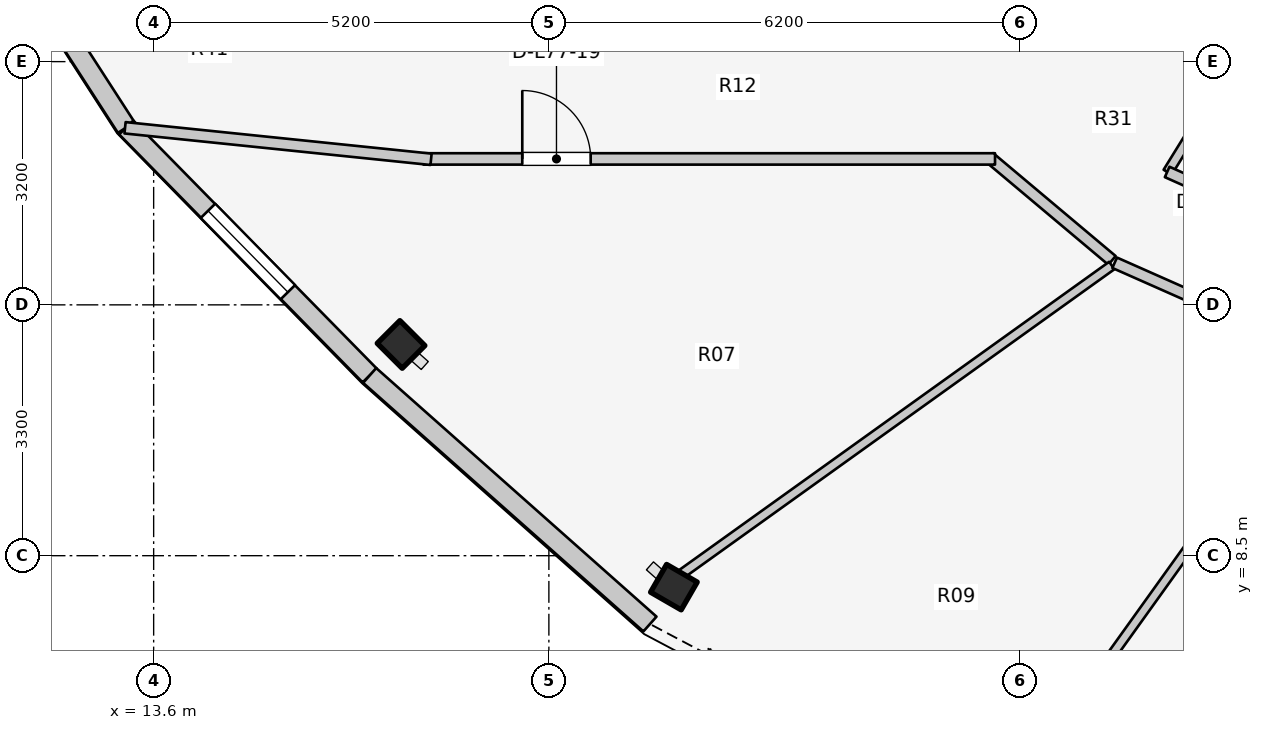
"""IFC4 building model, lengths in metres.
Left out: names, types, materials, properties, quantities, classifications, styles, units other than length and angle.
Written with IfcOpenShell. Run it as: python <this file> out.ifc"""

import sys

from ifc_helpers import new_model, si_unit, direction, frame, frame_2d, origin, origin_2d, place, context, subcontext, project, spatial, rectangle, i_section, extrude, element, fill, save


model = new_model("IFC4")
c1 = context("Model", 3, precision=1e-05, world=origin(), true_north=direction((0.0, 1.0)))
c2 = subcontext(c1, "Body", "Model", "MODEL_VIEW")
j1 = project(units=[si_unit("LENGTHUNIT", "METRE"), si_unit("PLANEANGLEUNIT", "RADIAN")], contexts=[c1])
p1 = place(None, origin())
s1 = spatial("IfcSite", under=j1, at=p1, CompositionType="ELEMENT")
p2 = place(p1, origin())
s2 = spatial("IfcBuilding", under=s1, at=p2, CompositionType="ELEMENT")
p3 = place(p2, frame((0.0, 0.0, 253.2)))
s3 = spatial("IfcBuildingStorey", under=s2, at=p3, CompositionType="ELEMENT", Elevation=253.2)
for number, where, z_axis, x_axis in (
    (1, (16.855, 11.279, 0.0), (0.0, 0.0, 1.0), (-0.707, -0.707, 0.0)),
    (2, (20.445, 8.086, 0.0), (0.0, 0.0, 1.0), (-0.5, -0.866, 0.0)),
):
    element("IfcColumn", number, at=place(p3, frame(where, z_axis=z_axis, x_axis=x_axis)), inside=s3, PredefinedType="COLUMN", context=c2, shape_type="SweptSolid", body=[
        extrude(i_section(OverallWidth=0.422, OverallDepth=0.465, WebThickness=0.045, FlangeThickness=0.073, FilletRadius=0.025, at=origin_2d()), origin(), (0.0, 0.0, 1.0), 3.6),
    ])
p4 = place(p3, frame((10.895, 17.761, 0.0), z_axis=(0.0, 0.0, 1.0), x_axis=(0.542641766008, -0.839964233634, 0.0)))
e3 = element("IfcWall", 3, at=p4, inside=s3, PredefinedType="STANDARD", context=c2, shape_type="SweptSolid", body=[
    extrude(rectangle(XDim=4.319, YDim=0.26, at=frame_2d((2.16, 0.0))), origin(), (0.0, 0.0, 1.0), 3.29),
])
p5 = place(p4, frame((1.41, 0.0, 0.75)))
e4 = element("IfcOpeningElement", 4, at=p5, cuts=e3, PredefinedType="OPENING", context=c2, shape_type="SweptSolid", body=[
    extrude(rectangle(XDim=1.5, YDim=1.6, at=frame_2d((0.75, 0.8))), frame((0.0, 0.14, 0.0), z_axis=(0.0, -1.0, 0.0), x_axis=(1.0, 0.0, 0.0)), (0.0, 0.0, 1.0), 0.28),
])
p6 = place(p3, frame((13.239, 14.133, 0.0), z_axis=(0.0, 0.0, 1.0), x_axis=(0.700642973333, -0.713512034881, 0.0)))
e5 = element("IfcWall", 5, at=p6, inside=s3, PredefinedType="STANDARD", context=c2, shape_type="SweptSolid", body=[
    extrude(rectangle(XDim=4.572, YDim=0.26, at=frame_2d((2.286, 0.0))), origin(), (0.0, 0.0, 1.0), 3.29),
])
p7 = place(p6, frame((1.536, 0.0, 0.75)))
e6 = element("IfcOpeningElement", 6, at=p7, cuts=e5, PredefinedType="OPENING", context=c2, shape_type="SweptSolid", body=[
    extrude(rectangle(XDim=1.5, YDim=1.6, at=frame_2d((0.75, 0.8))), frame((0.0, 0.14, 0.0), z_axis=(0.0, -1.0, 0.0), x_axis=(1.0, 0.0, 0.0)), (0.0, 0.0, 1.0), 0.28),
])
p8 = place(p3, frame((16.442, 10.871, 0.0), z_axis=(0.0, 0.0, 1.0), x_axis=(0.748165854006, -0.663511759428, 0.0)))
e7 = element("IfcWall", 7, at=p8, inside=s3, PredefinedType="STANDARD", context=c2, shape_type="SweptSolid", body=[
    extrude(rectangle(XDim=4.929, YDim=0.26, at=frame_2d((2.464, 0.0))), origin(), (0.0, 0.0, 1.0), 3.29),
])
p9 = place(p3, frame((28.45, 15.985, 0.0), z_axis=(0.0, 0.0, 1.0), x_axis=(-0.52592395012, -0.850531597702, 0.0)))
e8 = element("IfcWall", 8, at=p9, inside=s3, PredefinedType="PARTITIONING", context=c2, shape_type="SweptSolid", body=[
    extrude(rectangle(XDim=2.869, YDim=0.125, at=frame_2d((1.435, 0.0))), origin(), (0.0, 0.0, 1.0), 2.672),
])
p10 = place(p3, frame((26.935, 13.549, 0.0), z_axis=(0.0, 0.0, 1.0), x_axis=(0.912859324183, -0.408274239027, 0.0)))
e9 = element("IfcWall", 9, at=p10, inside=s3, PredefinedType="PARTITIONING", context=c2, shape_type="SweptSolid", body=[
    extrude(rectangle(XDim=2.682, YDim=0.15, at=frame_2d((1.341, 0.0))), origin(), (0.0, 0.0, 1.0), 2.816),
])
p11 = place(p3, frame((26.209, 12.385, 0.0), z_axis=(0.0, 0.0, 1.0), x_axis=(-0.765677451641, 0.643224719711, 0.0)))
e10 = element("IfcWall", 10, at=p11, inside=s3, PredefinedType="PARTITIONING", context=c2, shape_type="SweptSolid", body=[
    extrude(rectangle(XDim=2.105, YDim=0.15, at=frame_2d((1.053, 0.0))), origin(), (0.0, 0.0, 1.0), 2.816),
])
p12 = place(p3, frame((17.15, 13.72, 0.0), z_axis=(0.0, 0.0, 1.0), x_axis=(1.0, 0.0, 0.0)))
e11 = element("IfcWall", 11, at=p12, inside=s3, PredefinedType="PARTITIONING", context=c2, shape_type="SweptSolid", body=[
    extrude(rectangle(XDim=7.52, YDim=0.15, at=frame_2d((3.76, 0.0))), origin(), (0.0, 0.0, 1.0), 2.816),
])
p13 = place(p12, frame((1.3, 0.0, 0.0)))
e12 = element("IfcOpeningElement", 12, at=p13, cuts=e11, PredefinedType="OPENING", context=c2, shape_type="SweptSolid", body=[
    extrude(rectangle(XDim=0.9, YDim=2.1, at=frame_2d((0.45, 1.05))), frame((0.0, 0.085, 0.0), z_axis=(0.0, -1.0, 0.0), x_axis=(1.0, 0.0, 0.0)), (0.0, 0.0, 1.0), 0.17),
])
p14 = place(p3, frame((17.25, 13.715, 0.0), z_axis=(0.0, 0.0, 1.0), x_axis=(-0.994734711466, 0.102483431859, 0.0)))
e13 = element("IfcWall", 13, at=p14, inside=s3, PredefinedType="PARTITIONING", context=c2, shape_type="SweptSolid", body=[
    extrude(rectangle(XDim=4.047, YDim=0.15, at=frame_2d((2.024, 0.0))), origin(), (0.0, 0.0, 1.0), 2.66),
])
p15 = place(p3, frame((26.206, 12.318, 0.0), z_axis=(0.0, 0.0, 1.0), x_axis=(-0.812763742602, -0.582593424879, 0.0)))
e14 = element("IfcWall", 14, at=p15, inside=s3, PredefinedType="MOVABLE", context=c2, shape_type="SweptSolid", body=[
    extrude(rectangle(XDim=6.966, YDim=0.12, at=frame_2d((3.483, 0.0))), origin(), (0.0, 0.0, 1.0), 2.66),
])
p16 = place(p3, frame((28.992, 11.076, 0.0), z_axis=(0.0, 0.0, 1.0), x_axis=(-0.582726066442, -0.812668648029, 0.0)))
e15 = element("IfcWall", 15, at=p16, inside=s3, PredefinedType="MOVABLE", context=c2, shape_type="SweptSolid", body=[
    extrude(rectangle(XDim=6.515, YDim=0.12, at=frame_2d((3.257, 0.0))), origin(), (0.0, 0.0, 1.0), 2.66),
])
p17 = place(p3, frame((26.244, 12.354, 0.0), z_axis=(0.0, 0.0, 1.0), x_axis=(0.914302802833, -0.405031337963, 0.0)))
e16 = element("IfcWall", 16, at=p17, inside=s3, PredefinedType="PARTITIONING", context=c2, shape_type="SweptSolid", body=[
    extrude(rectangle(XDim=3.049, YDim=0.15, at=frame_2d((1.525, 0.0))), origin(), (0.0, 0.0, 1.0), 2.816),
])
p18 = place(p17, frame((1.05, 0.0, 0.0)))
e17 = element("IfcOpeningElement", 17, at=p18, cuts=e16, PredefinedType="OPENING", context=c2, shape_type="SweptSolid", body=[
    extrude(rectangle(XDim=0.95, YDim=2.1, at=frame_2d((0.475, 1.05))), frame((0.0, 0.085, 0.0), z_axis=(0.0, -1.0, 0.0), x_axis=(1.0, 0.0, 0.0)), (0.0, 0.0, 1.0), 0.17),
])
p19 = place(p7, origin())
e18 = element("IfcWindow", 18, at=p19, inside=s3, PartitioningType="SINGLE_PANEL", PredefinedType="WINDOW", context=c2, shape_type="SweptSolid", body=[
    extrude(rectangle(XDim=1.5, YDim=1.6, at=frame_2d((0.75, 0.8))), frame((0.0, 0.03, 0.0), z_axis=(0.0, -1.0, 0.0), x_axis=(1.0, 0.0, 0.0)), (0.0, 0.0, 1.0), 0.06),
])
fill(e6, e18)
p20 = place(p13, origin())
e19 = element("IfcDoor", 19, at=p20, inside=s3, OperationType="SINGLE_SWING_LEFT", PredefinedType="DOOR", context=c2, shape_type="SweptSolid", body=[
    extrude(rectangle(XDim=0.9, YDim=2.1, at=frame_2d((0.45, 1.05))), frame((0.0, 0.025, 0.0), z_axis=(0.0, -1.0, 0.0), x_axis=(1.0, 0.0, 0.0)), (0.0, 0.0, 1.0), 0.05),
])
fill(e12, e19)
save(model, sys.argv[1])
